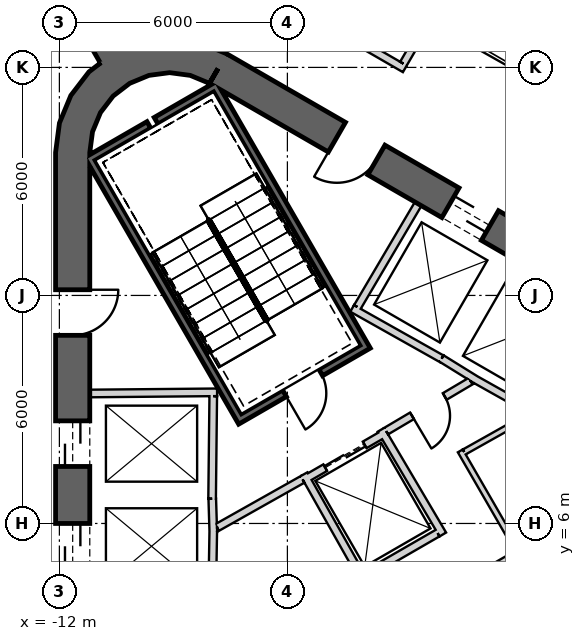
"""IFC4 building model, lengths in metres.
Left out: names, types, materials, properties, quantities, classifications, styles, units other than length and angle.
Written with IfcOpenShell. Run it as: python <this file> out.ifc"""

import sys

from ifc_helpers import new_model, si_unit, direction, frame, frame_2d, origin, place, context, subcontext, project, spatial, polyline, rectangle, outline, extrude, element, fill, save


model = new_model("IFC4")
c1 = context("Model", 3, precision=1e-05, world=origin(), true_north=direction((0.0, 1.0)))
c2 = subcontext(c1, "Body", "Model", "MODEL_VIEW")
j1 = project(units=[si_unit("LENGTHUNIT", "METRE"), si_unit("PLANEANGLEUNIT", "RADIAN")], contexts=[c1])
p1 = place(None, origin())
s1 = spatial("IfcSite", under=j1, at=p1, CompositionType="ELEMENT")
p2 = place(p1, origin())
s2 = spatial("IfcBuilding", under=s1, at=p2, CompositionType="ELEMENT")
p3 = place(p2, frame((0.0, 0.0, 33.5)))
s3 = spatial("IfcBuildingStorey", under=s2, at=p3, CompositionType="ELEMENT", Elevation=33.5)
p4 = place(p3, frame((19.475, 2.208, 0.0), z_axis=(0.0, 0.0, 1.0), x_axis=(-0.866028369851, 0.499994862586, 0.0)))
e1 = element("IfcWall", 1, at=p4, inside=s3, PredefinedType="SHEAR", context=c2, shape_type="SweptSolid", body=[
    extrude(rectangle(XDim=31.523, YDim=0.9, at=frame_2d((15.762, 0.0))), origin(), (0.0, 0.0, 1.0), 6.0),
])
p5 = place(p4, frame((7.062, 0.0, 0.0)))
e2 = element("IfcOpeningElement", 2, at=p5, cuts=e1, PredefinedType="OPENING", context=c2, shape_type="SweptSolid", body=[
    extrude(rectangle(XDim=1.2, YDim=2.4, at=frame_2d((0.6, 1.2))), frame((0.0, 0.46, 0.0), z_axis=(0.0, -1.0, 0.0), x_axis=(1.0, 0.0, 0.0)), (0.0, 0.0, 1.0), 0.92),
])
p6 = place(p4, frame((9.762, 0.0, 0.0)))
e3 = element("IfcOpeningElement", 3, at=p6, cuts=e1, PredefinedType="OPENING", context=c2, shape_type="SweptSolid", body=[
    extrude(rectangle(XDim=1.2, YDim=2.4, at=frame_2d((0.6, 1.2))), frame((0.0, 0.46, 0.0), z_axis=(0.0, -1.0, 0.0), x_axis=(1.0, 0.0, 0.0)), (0.0, 0.0, 1.0), 0.92),
])
p7 = place(p4, frame((12.462, 0.0, 0.0)))
e4 = element("IfcOpeningElement", 4, at=p7, cuts=e1, PredefinedType="OPENING", context=c2, shape_type="SweptSolid", body=[
    extrude(rectangle(XDim=1.2, YDim=2.4, at=frame_2d((0.6, 1.2))), frame((0.0, 0.46, 0.0), z_axis=(0.0, -1.0, 0.0), x_axis=(1.0, 0.0, 0.0)), (0.0, 0.0, 1.0), 0.92),
])
p8 = place(p4, frame((15.162, 0.0, 0.0)))
e5 = element("IfcOpeningElement", 5, at=p8, cuts=e1, PredefinedType="OPENING", context=c2, shape_type="SweptSolid", body=[
    extrude(rectangle(XDim=1.2, YDim=2.4, at=frame_2d((0.6, 1.2))), frame((0.0, 0.46, 0.0), z_axis=(0.0, -1.0, 0.0), x_axis=(1.0, 0.0, 0.0)), (0.0, 0.0, 1.0), 0.92),
])
p9 = place(p4, frame((17.862, 0.0, 0.0)))
e6 = element("IfcOpeningElement", 6, at=p9, cuts=e1, PredefinedType="OPENING", context=c2, shape_type="SweptSolid", body=[
    extrude(rectangle(XDim=1.2, YDim=2.4, at=frame_2d((0.6, 1.2))), frame((0.0, 0.46, 0.0), z_axis=(0.0, -1.0, 0.0), x_axis=(1.0, 0.0, 0.0)), (0.0, 0.0, 1.0), 0.92),
])
p10 = place(p4, frame((20.562, 0.0, 0.0)))
e7 = element("IfcOpeningElement", 7, at=p10, cuts=e1, PredefinedType="OPENING", context=c2, shape_type="SweptSolid", body=[
    extrude(rectangle(XDim=1.2, YDim=2.4, at=frame_2d((0.6, 1.2))), frame((0.0, 0.46, 0.0), z_axis=(0.0, -1.0, 0.0), x_axis=(1.0, 0.0, 0.0)), (0.0, 0.0, 1.0), 0.92),
])
p11 = place(p4, frame((23.262, 0.0, 0.0)))
e8 = element("IfcOpeningElement", 8, at=p11, cuts=e1, PredefinedType="OPENING", context=c2, shape_type="SweptSolid", body=[
    extrude(rectangle(XDim=1.2, YDim=2.4, at=frame_2d((0.6, 1.2))), frame((0.0, 0.46, 0.0), z_axis=(0.0, -1.0, 0.0), x_axis=(1.0, 0.0, 0.0)), (0.0, 0.0, 1.0), 0.92),
])
p12 = place(p4, frame((3.612, 0.0, 0.0)))
e9 = element("IfcOpeningElement", 9, at=p12, cuts=e1, PredefinedType="OPENING", context=c2, shape_type="SweptSolid", body=[
    extrude(rectangle(XDim=1.2, YDim=2.4, at=frame_2d((0.6, 1.2))), frame((0.0, 0.46, 0.0), z_axis=(0.0, -1.0, 0.0), x_axis=(1.0, 0.0, 0.0)), (0.0, 0.0, 1.0), 0.92),
])
p13 = place(p4, frame((26.712, 0.0, 0.0)))
e10 = element("IfcOpeningElement", 10, at=p13, cuts=e1, PredefinedType="OPENING", context=c2, shape_type="SweptSolid", body=[
    extrude(rectangle(XDim=1.2, YDim=2.4, at=frame_2d((0.6, 1.2))), frame((0.0, 0.46, 0.0), z_axis=(0.0, -1.0, 0.0), x_axis=(1.0, 0.0, 0.0)), (0.0, 0.0, 1.0), 0.92),
])
p14 = place(p3, frame((-11.65, 15.762, 0.0), z_axis=(0.0, 0.0, 1.0), x_axis=(0.0, -1.0, 0.0)))
e11 = element("IfcWall", 11, at=p14, inside=s3, PredefinedType="SHEAR", context=c2, shape_type="SweptSolid", body=[
    extrude(rectangle(XDim=31.523, YDim=0.9, at=frame_2d((15.762, 0.0))), origin(), (0.0, 0.0, 1.0), 6.0),
])
p15 = place(p14, frame((7.062, 0.0, 0.0)))
e12 = element("IfcOpeningElement", 12, at=p15, cuts=e11, PredefinedType="OPENING", context=c2, shape_type="SweptSolid", body=[
    extrude(rectangle(XDim=1.2, YDim=2.4, at=frame_2d((0.6, 1.2))), frame((0.0, 0.46, 0.0), z_axis=(0.0, -1.0, 0.0), x_axis=(1.0, 0.0, 0.0)), (0.0, 0.0, 1.0), 0.92),
])
p16 = place(p14, frame((9.762, 0.0, 0.0)))
e13 = element("IfcOpeningElement", 13, at=p16, cuts=e11, PredefinedType="OPENING", context=c2, shape_type="SweptSolid", body=[
    extrude(rectangle(XDim=1.2, YDim=2.4, at=frame_2d((0.6, 1.2))), frame((0.0, 0.46, 0.0), z_axis=(0.0, -1.0, 0.0), x_axis=(1.0, 0.0, 0.0)), (0.0, 0.0, 1.0), 0.92),
])
p17 = place(p14, frame((12.462, 0.0, 0.0)))
e14 = element("IfcOpeningElement", 14, at=p17, cuts=e11, PredefinedType="OPENING", context=c2, shape_type="SweptSolid", body=[
    extrude(rectangle(XDim=1.2, YDim=2.4, at=frame_2d((0.6, 1.2))), frame((0.0, 0.46, 0.0), z_axis=(0.0, -1.0, 0.0), x_axis=(1.0, 0.0, 0.0)), (0.0, 0.0, 1.0), 0.92),
])
p18 = place(p14, frame((15.162, 0.0, 0.0)))
e15 = element("IfcOpeningElement", 15, at=p18, cuts=e11, PredefinedType="OPENING", context=c2, shape_type="SweptSolid", body=[
    extrude(rectangle(XDim=1.2, YDim=2.4, at=frame_2d((0.6, 1.2))), frame((0.0, 0.46, 0.0), z_axis=(0.0, -1.0, 0.0), x_axis=(1.0, 0.0, 0.0)), (0.0, 0.0, 1.0), 0.92),
])
p19 = place(p14, frame((17.862, 0.0, 0.0)))
e16 = element("IfcOpeningElement", 16, at=p19, cuts=e11, PredefinedType="OPENING", context=c2, shape_type="SweptSolid", body=[
    extrude(rectangle(XDim=1.2, YDim=2.4, at=frame_2d((0.6, 1.2))), frame((0.0, 0.46, 0.0), z_axis=(0.0, -1.0, 0.0), x_axis=(1.0, 0.0, 0.0)), (0.0, 0.0, 1.0), 0.92),
])
p20 = place(p14, frame((20.562, 0.0, 0.0)))
e17 = element("IfcOpeningElement", 17, at=p20, cuts=e11, PredefinedType="OPENING", context=c2, shape_type="SweptSolid", body=[
    extrude(rectangle(XDim=1.2, YDim=2.4, at=frame_2d((0.6, 1.2))), frame((0.0, 0.46, 0.0), z_axis=(0.0, -1.0, 0.0), x_axis=(1.0, 0.0, 0.0)), (0.0, 0.0, 1.0), 0.92),
])
p21 = place(p14, frame((23.262, 0.0, 0.0)))
e18 = element("IfcOpeningElement", 18, at=p21, cuts=e11, PredefinedType="OPENING", context=c2, shape_type="SweptSolid", body=[
    extrude(rectangle(XDim=1.2, YDim=2.4, at=frame_2d((0.6, 1.2))), frame((0.0, 0.46, 0.0), z_axis=(0.0, -1.0, 0.0), x_axis=(1.0, 0.0, 0.0)), (0.0, 0.0, 1.0), 0.92),
])
p22 = place(p14, frame((3.612, 0.0, 0.0)))
e19 = element("IfcOpeningElement", 19, at=p22, cuts=e11, PredefinedType="OPENING", context=c2, shape_type="SweptSolid", body=[
    extrude(rectangle(XDim=1.2, YDim=2.4, at=frame_2d((0.6, 1.2))), frame((0.0, 0.46, 0.0), z_axis=(0.0, -1.0, 0.0), x_axis=(1.0, 0.0, 0.0)), (0.0, 0.0, 1.0), 0.92),
])
p23 = place(p14, frame((26.712, 0.0, 0.0)))
e20 = element("IfcOpeningElement", 20, at=p23, cuts=e11, PredefinedType="OPENING", context=c2, shape_type="SweptSolid", body=[
    extrude(rectangle(XDim=1.2, YDim=2.4, at=frame_2d((0.6, 1.2))), frame((0.0, 0.46, 0.0), z_axis=(0.0, -1.0, 0.0), x_axis=(1.0, 0.0, 0.0)), (0.0, 0.0, 1.0), 0.92),
])
p24 = place(p3, origin())
e21 = element("IfcWall", 21, at=p24, inside=s3, PredefinedType="SHEAR", context=c2, shape_type="SweptSolid", body=[
    extrude(outline(polyline([(-7.6, 18.36), (-8.323, 18.659), (-9.1, 18.762), (-9.876, 18.659), (-10.6, 18.36), (-11.221, 17.883), (-11.698, 17.262), (-11.998, 16.538), (-12.1, 15.762), (-11.2, 15.762), (-11.128, 16.305), (-10.919, 16.812), (-10.585, 17.247), (-10.15, 17.58), (-9.644, 17.79), (-9.1, 17.862), (-8.556, 17.79), (-8.05, 17.58), (-7.6, 18.36)])), origin(), (0.0, 0.0, 1.0), 6.0),
])
p25 = place(p3, frame((-10.575, 18.316, 0.0), z_axis=(0.0, 0.0, 1.0), x_axis=(-0.499996575515, 0.866027380903, 0.0)))
e22 = element("IfcWall", 22, at=p25, inside=s3, PredefinedType="SHEAR", context=c2, shape_type="SweptSolid", body=[
    extrude(rectangle(XDim=13.954, YDim=0.8, at=frame_2d((6.977, 0.0))), origin(), (0.0, 0.0, 1.0), 6.0),
])
p26 = place(p25, frame((2.05, 0.0, 0.0)))
e23 = element("IfcOpeningElement", 23, at=p26, cuts=e22, PredefinedType="OPENING", context=c2, shape_type="SweptSolid", body=[
    extrude(rectangle(XDim=1.4, YDim=2.4, at=frame_2d((0.7, 1.2))), frame((0.0, 0.41, 0.0), z_axis=(0.0, -1.0, 0.0), x_axis=(1.0, 0.0, 0.0)), (0.0, 0.0, 1.0), 0.82),
])
p27 = place(p3, frame((-11.2, 9.42, 0.0), z_axis=(0.0, 0.0, 1.0), x_axis=(0.999957167047, 0.009255488683, 0.0)))
e24 = element("IfcWall", 24, at=p27, inside=s3, PredefinedType="PLUMBINGWALL", context=c2, shape_type="SweptSolid", body=[
    extrude(rectangle(XDim=3.35, YDim=0.2, at=frame_2d((1.675, 0.0))), origin(), (0.0, 0.0, 1.0), 5.65),
])
p28 = place(p3, frame((-7.951, 9.35, 0.0), z_axis=(0.0, 0.0, 1.0), x_axis=(-0.011120469654, -0.999938165666, 0.0)))
e25 = element("IfcWall", 25, at=p28, inside=s3, PredefinedType="PLUMBINGWALL", context=c2, shape_type="SweptSolid", body=[
    extrude(rectangle(XDim=2.7, YDim=0.2, at=frame_2d((1.35, 0.0))), origin(), (0.0, 0.0, 1.0), 5.65),
])
p29 = place(p3, frame((-7.977, 6.65, 0.0), z_axis=(0.0, 0.0, 1.0), x_axis=(0.030861509705, -0.999523670164, 0.0)))
e26 = element("IfcWall", 26, at=p29, inside=s3, PredefinedType="PLUMBINGWALL", context=c2, shape_type="SweptSolid", body=[
    extrude(rectangle(XDim=0.878, YDim=0.2, at=frame_2d((0.439, 0.0))), origin(), (0.0, 0.0, 1.0), 5.65),
])
p30 = place(p3, frame((-7.949, 5.894, 0.0), z_axis=(0.0, 0.0, 1.0), x_axis=(-0.016809909365, -0.999858703491, 0.0)))
e27 = element("IfcWall", 27, at=p30, inside=s3, PredefinedType="PLUMBINGWALL", context=c2, shape_type="SweptSolid", body=[
    extrude(rectangle(XDim=1.844, YDim=0.2, at=frame_2d((0.922, 0.0))), origin(), (0.0, 0.0, 1.0), 5.65),
])
p31 = place(p3, frame((-1.941, 10.339, 0.0), z_axis=(0.0, 0.0, 1.0), x_axis=(0.850216889117, -0.526432561171, 0.0)))
e28 = element("IfcWall", 28, at=p31, inside=s3, PredefinedType="PLUMBINGWALL", context=c2, shape_type="SweptSolid", body=[
    extrude(rectangle(XDim=1.078, YDim=0.2, at=frame_2d((0.539, 0.0))), origin(), (0.0, 0.0, 1.0), 5.65),
])
p32 = place(p3, frame((0.478, 8.928, 0.0), z_axis=(0.0, 0.0, 1.0), x_axis=(-0.871988740738, 0.489525929882, 0.0)))
e29 = element("IfcWall", 29, at=p32, inside=s3, PredefinedType="PLUMBINGWALL", context=c2, shape_type="SweptSolid", body=[
    extrude(rectangle(XDim=1.845, YDim=0.2, at=frame_2d((0.922, 0.0))), origin(), (0.0, 0.0, 1.0), 5.65),
])
p33 = place(p3, frame((-4.296, 11.659, 0.0), z_axis=(0.0, 0.0, 1.0), x_axis=(0.871534483978, -0.490334215854, 0.0)))
e30 = element("IfcWall", 30, at=p33, inside=s3, PredefinedType="PLUMBINGWALL", context=c2, shape_type="SweptSolid", body=[
    extrude(rectangle(XDim=2.7, YDim=0.2, at=frame_2d((1.35, 0.0))), origin(), (0.0, 0.0, 1.0), 5.65),
])
p34 = place(p3, frame((-4.158, 11.696, 0.0), z_axis=(0.0, 0.0, 1.0), x_axis=(0.508018930956, 0.861345903683, 0.0)))
e31 = element("IfcWall", 31, at=p34, inside=s3, PredefinedType="PLUMBINGWALL", context=c2, shape_type="SweptSolid", body=[
    extrude(rectangle(XDim=3.15, YDim=0.2, at=frame_2d((1.575, 0.0))), origin(), (0.0, 0.0, 1.0), 5.65),
])
p35 = place(p3, frame((-11.245, 15.678, -0.3), z_axis=(0.0, 0.0, 1.0), x_axis=(0.499977274689, -0.866038523851, 0.0)))
e32 = element("IfcWall", 32, at=p35, inside=s3, PredefinedType="SHEAR", context=c2, shape_type="SweptSolid", body=[
    extrude(rectangle(XDim=8.1, YDim=0.2, at=frame_2d((4.05, 0.0))), origin(), (0.0, 0.0, 1.0), 5.95),
])
p36 = place(p3, frame((-7.818, 17.541, -0.3), z_axis=(0.0, 0.0, 1.0), x_axis=(-0.866088799389, -0.499890179513, 0.0)))
e33 = element("IfcWall", 33, at=p36, inside=s3, PredefinedType="SHEAR", context=c2, shape_type="SweptSolid", body=[
    extrude(rectangle(XDim=1.89, YDim=0.2, at=frame_2d((0.945, 0.0))), origin(), (0.0, 0.0, 1.0), 5.95),
])
p37 = place(p3, frame((-9.645, 16.486, -0.3), z_axis=(0.0, 0.0, 1.0), x_axis=(-0.866038843867, -0.499976720371, 0.0)))
e34 = element("IfcWall", 34, at=p37, inside=s3, PredefinedType="SHEAR", context=c2, shape_type="SweptSolid", body=[
    extrude(rectangle(XDim=1.69, YDim=0.2, at=frame_2d((0.845, 0.0))), origin(), (0.0, 0.0, 1.0), 5.95),
])
p38 = place(p3, frame((-7.854, 17.405, -0.3), z_axis=(0.0, 0.0, 1.0), x_axis=(0.499997992926, -0.866026562566, 0.0)))
e35 = element("IfcWall", 35, at=p38, inside=s3, PredefinedType="SHEAR", context=c2, shape_type="SweptSolid", body=[
    extrude(rectangle(XDim=7.9, YDim=0.2, at=frame_2d((3.95, 0.0))), origin(), (0.0, 0.0, 1.0), 5.95),
])
p39 = place(p3, frame((-7.159, 8.8, -0.3), z_axis=(0.0, 0.0, 1.0), x_axis=(0.866047807691, 0.499961193289, 0.0)))
e36 = element("IfcWall", 36, at=p39, inside=s3, PredefinedType="SHEAR", context=c2, shape_type="SweptSolid", body=[
    extrude(rectangle(XDim=3.6, YDim=0.2, at=frame_2d((1.8, 0.0))), origin(), (0.0, 0.0, 1.0), 5.95),
])
p40 = place(p39, frame((1.25, 0.0, 0.3)))
e37 = element("IfcOpeningElement", 37, at=p40, cuts=e36, PredefinedType="OPENING", context=c2, shape_type="SweptSolid", body=[
    extrude(rectangle(XDim=1.1, YDim=2.1, at=frame_2d((0.55, 1.05))), frame((0.0, 0.11, 0.0), z_axis=(0.0, -1.0, 0.0), x_axis=(1.0, 0.0, 0.0)), (0.0, 0.0, 1.0), 0.22),
])
p41 = place(p3, frame((-5.524, 7.168, 0.0), z_axis=(0.0, 0.0, 1.0), x_axis=(0.866024647952, 0.500001309137, 0.0)))
e38 = element("IfcWall", 38, at=p41, inside=s3, PredefinedType="PLUMBINGWALL", context=c2, shape_type="SweptSolid", body=[
    extrude(rectangle(XDim=2.4, YDim=0.2, at=frame_2d((1.2, 0.0))), origin(), (0.0, 0.0, 1.0), 5.65),
])
p42 = place(p41, frame((0.6, 0.0, 0.0)))
e39 = element("IfcOpeningElement", 39, at=p42, cuts=e38, PredefinedType="OPENING", context=c2, shape_type="SweptSolid", body=[
    extrude(rectangle(XDim=1.2, YDim=2.4, at=frame_2d((0.6, 1.2))), frame((0.0, 0.11, 0.0), z_axis=(0.0, -1.0, 0.0), x_axis=(1.0, 0.0, 0.0)), (0.0, 0.0, 1.0), 0.22),
])
p43 = place(p3, frame((-4.039, 4.596, 0.0), z_axis=(0.0, 0.0, 1.0), x_axis=(-0.491322718731, 0.870977603649, 0.0)))
e40 = element("IfcWall", 40, at=p43, inside=s3, PredefinedType="PLUMBINGWALL", context=c2, shape_type="SweptSolid", body=[
    extrude(rectangle(XDim=3.1, YDim=0.2, at=frame_2d((1.55, 0.0))), origin(), (0.0, 0.0, 1.0), 5.65),
])
p44 = place(p3, frame((-3.538, 8.465, 0.0), z_axis=(0.0, 0.0, 1.0), x_axis=(0.508616218331, -0.860993346345, 0.0)))
e41 = element("IfcWall", 41, at=p44, inside=s3, PredefinedType="PLUMBINGWALL", context=c2, shape_type="SweptSolid", body=[
    extrude(rectangle(XDim=3.2, YDim=0.2, at=frame_2d((1.6, 0.0))), origin(), (0.0, 0.0, 1.0), 5.65),
])
p45 = place(p3, frame((-2.047, 5.746, 0.0), z_axis=(0.0, 0.0, 1.0), x_axis=(-0.866032100247, -0.499988401207, 0.0)))
e42 = element("IfcWall", 42, at=p45, inside=s3, PredefinedType="PLUMBINGWALL", context=c2, shape_type="SweptSolid", body=[
    extrude(rectangle(XDim=2.04, YDim=0.2, at=frame_2d((1.02, 0.0))), origin(), (0.0, 0.0, 1.0), 5.65),
])
p46 = place(p3, frame((-5.6, 7.16, 0.0), z_axis=(0.0, 0.0, 1.0), x_axis=(-0.871340486379, -0.490678873396, 0.0)))
e43 = element("IfcWall", 43, at=p46, inside=s3, PredefinedType="PARTITIONING", context=c2, shape_type="SweptSolid", body=[
    extrude(rectangle(XDim=2.581, YDim=0.2, at=frame_2d((1.291, 0.0))), origin(), (0.0, 0.0, 1.0), 5.65),
])
p47 = place(p3, frame((-1.179, 9.745, 0.0), z_axis=(0.0, 0.0, 1.0), x_axis=(-0.860598681535, -0.509283721849, 0.0)))
e44 = element("IfcWall", 44, at=p47, inside=s3, PredefinedType="PARTITIONING", context=c2, shape_type="SweptSolid", body=[
    extrude(rectangle(XDim=2.581, YDim=0.2, at=frame_2d((1.291, 0.0))), origin(), (0.0, 0.0, 1.0), 5.65),
])
p48 = place(p47, frame((0.791, 0.0, 0.0)))
e45 = element("IfcOpeningElement", 45, at=p48, cuts=e44, PredefinedType="OPENING", context=c2, shape_type="SweptSolid", body=[
    extrude(rectangle(XDim=1.0, YDim=2.1, at=frame_2d((0.5, 1.05))), frame((0.0, 0.11, 0.0), z_axis=(0.0, -1.0, 0.0), x_axis=(1.0, 0.0, 0.0)), (0.0, 0.0, 1.0), 0.22),
])
p49 = place(p3, frame((0.153, 5.285, 0.0), z_axis=(0.0, 0.0, 1.0), x_axis=(-0.866033964044, -0.499985172903, 0.0)))
e46 = element("IfcWall", 46, at=p49, inside=s3, PredefinedType="PLUMBINGWALL", context=c2, shape_type="SweptSolid", body=[
    extrude(rectangle(XDim=1.85, YDim=0.15, at=frame_2d((0.925, 0.0))), origin(), (0.0, 0.0, 1.0), 5.65),
])
p50 = place(p3, frame((-1.449, 7.91, 0.0), z_axis=(0.0, 0.0, 1.0), x_axis=(0.499990139034, -0.866031096941, 0.0)))
e47 = element("IfcWall", 47, at=p50, inside=s3, PredefinedType="PLUMBINGWALL", context=c2, shape_type="SweptSolid", body=[
    extrude(rectangle(XDim=3.0, YDim=0.15, at=frame_2d((1.5, 0.0))), origin(), (0.0, 0.0, 1.0), 5.65),
])
p51 = place(p3, frame((0.475, 8.905, 0.0), z_axis=(0.0, 0.0, 1.0), x_axis=(-0.871843752163, -0.489784107353, 0.0)))
e48 = element("IfcWall", 48, at=p51, inside=s3, PredefinedType="PLUMBINGWALL", context=c2, shape_type="SweptSolid", body=[
    extrude(rectangle(XDim=2.09, YDim=0.15, at=frame_2d((1.045, 0.0))), origin(), (0.0, 0.0, 1.0), 5.65),
])
p52 = place(p3, frame((-2.91, 17.962, 0.0), z_axis=(0.0, 0.0, 1.0), x_axis=(-0.866026229868, 0.499998569178, 0.0)))
e49 = element("IfcWall", 49, at=p52, inside=s3, PredefinedType="PARTITIONING", context=c2, shape_type="SweptSolid", body=[
    extrude(rectangle(XDim=4.592, YDim=0.2, at=frame_2d((2.296, 0.0))), origin(), (0.0, 0.0, 1.0), 4.83),
])
p53 = place(p3, frame((-2.947, 18.098, 0.0), z_axis=(0.0, 0.0, 1.0), x_axis=(0.503358836551, 0.864077474343, 0.0)))
e50 = element("IfcWall", 50, at=p53, inside=s3, PredefinedType="PARTITIONING", context=c2, shape_type="SweptSolid", body=[
    extrude(rectangle(XDim=8.003, YDim=0.2, at=frame_2d((4.002, 0.0))), origin(), (0.0, 0.0, 1.0), 4.83),
])
p54 = place(p40, origin())
e51 = element("IfcDoor", 51, at=p54, inside=s3, OperationType="SINGLE_SWING_LEFT", PredefinedType="USERDEFINED", context=c2, shape_type="SweptSolid", body=[
    extrude(rectangle(XDim=1.1, YDim=2.1, at=frame_2d((0.55, 1.05))), frame((0.0, 0.025, 0.0), z_axis=(0.0, -1.0, 0.0), x_axis=(1.0, 0.0, 0.0)), (0.0, 0.0, 1.0), 0.05),
])
fill(e37, e51)
p55 = place(p48, origin())
e52 = element("IfcDoor", 52, at=p55, inside=s3, OperationType="SINGLE_SWING_RIGHT", PredefinedType="USERDEFINED", context=c2, shape_type="SweptSolid", body=[
    extrude(rectangle(XDim=1.0, YDim=2.1, at=frame_2d((0.5, 1.05))), frame((0.0, 0.025, 0.0), z_axis=(0.0, -1.0, 0.0), x_axis=(1.0, 0.0, 0.0)), (0.0, 0.0, 1.0), 0.05),
])
fill(e45, e52)
p56 = place(p42, origin())
e53 = element("IfcDoor", 53, at=p56, inside=s3, OperationType="SLIDING_TO_LEFT", PredefinedType="USERDEFINED", context=c2, shape_type="SweptSolid", body=[
    extrude(rectangle(XDim=1.2, YDim=2.4, at=frame_2d((0.6, 1.2))), frame((0.0, 0.025, 0.0), z_axis=(0.0, -1.0, 0.0), x_axis=(1.0, 0.0, 0.0)), (0.0, 0.0, 1.0), 0.05),
])
fill(e39, e53)
p57 = place(p15, origin())
e54 = element("IfcDoor", 54, at=p57, inside=s3, OperationType="SLIDING_TO_LEFT", PredefinedType="USERDEFINED", context=c2, shape_type="SweptSolid", body=[
    extrude(rectangle(XDim=1.2, YDim=2.4, at=frame_2d((0.6, 1.2))), frame((0.0, 0.025, 0.0), z_axis=(0.0, -1.0, 0.0), x_axis=(1.0, 0.0, 0.0)), (0.0, 0.0, 1.0), 0.05),
])
fill(e12, e54)
p58 = place(p16, origin())
e55 = element("IfcDoor", 55, at=p58, inside=s3, OperationType="SLIDING_TO_LEFT", PredefinedType="USERDEFINED", context=c2, shape_type="SweptSolid", body=[
    extrude(rectangle(XDim=1.2, YDim=2.4, at=frame_2d((0.6, 1.2))), frame((0.0, 0.025, 0.0), z_axis=(0.0, -1.0, 0.0), x_axis=(1.0, 0.0, 0.0)), (0.0, 0.0, 1.0), 0.05),
])
fill(e13, e55)
p59 = place(p11, origin())
e56 = element("IfcDoor", 56, at=p59, inside=s3, OperationType="SLIDING_TO_LEFT", PredefinedType="USERDEFINED", context=c2, shape_type="SweptSolid", body=[
    extrude(rectangle(XDim=1.2, YDim=2.4, at=frame_2d((0.6, 1.2))), frame((0.0, 0.025, 0.0), z_axis=(0.0, -1.0, 0.0), x_axis=(1.0, 0.0, 0.0)), (0.0, 0.0, 1.0), 0.05),
])
fill(e8, e56)
p60 = place(p13, origin())
e57 = element("IfcDoor", 57, at=p60, inside=s3, OperationType="SINGLE_SWING_RIGHT", PredefinedType="USERDEFINED", context=c2, shape_type="SweptSolid", body=[
    extrude(rectangle(XDim=1.2, YDim=2.4, at=frame_2d((0.6, 1.2))), frame((0.0, 0.025, 0.0), z_axis=(0.0, -1.0, 0.0), x_axis=(1.0, 0.0, 0.0)), (0.0, 0.0, 1.0), 0.05),
])
fill(e10, e57)
p61 = place(p22, origin())
e58 = element("IfcDoor", 58, at=p61, inside=s3, OperationType="SINGLE_SWING_LEFT", PredefinedType="USERDEFINED", context=c2, shape_type="SweptSolid", body=[
    extrude(rectangle(XDim=1.2, YDim=2.4, at=frame_2d((0.6, 1.2))), frame((0.0, 0.025, 0.0), z_axis=(0.0, -1.0, 0.0), x_axis=(1.0, 0.0, 0.0)), (0.0, 0.0, 1.0), 0.05),
])
fill(e19, e58)
save(model, sys.argv[1])
